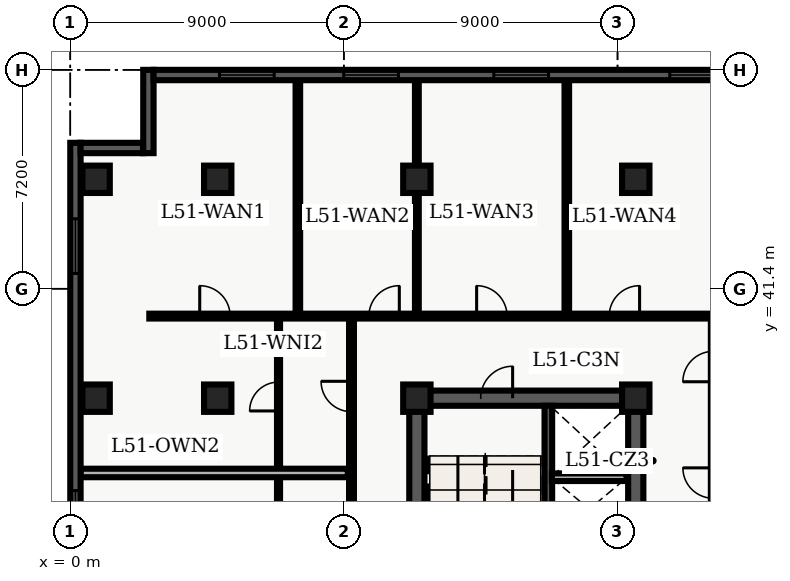
"""IFC4 building model, lengths in metres.
Left out: names, types, materials, properties, quantities, classifications, styles, units other than length and angle.
Written with IfcOpenShell. Run it as: python <this file> out.ifc"""

import sys

from ifc_helpers import new_model, entity, si_unit, converted_unit, direction, frame, origin_with_axes, origin_2d_with_axis, place, context, subcontext, project, spatial, polyline, rectangle, outline, extrude, element, fill, save


model = new_model("IFC4")
c1 = context("Model", 3, precision=1e-05, world=origin_with_axes(), true_north=direction((0.0, 1.0)))
c2 = subcontext(c1, "Body", "Model", "MODEL_VIEW")
j1 = project(units=[si_unit("LENGTHUNIT", "METRE"), converted_unit("PLANEANGLEUNIT", "DEGREE", entity("IfcPlaneAngleMeasure", 0.017), si_unit("PLANEANGLEUNIT", "RADIAN"), dimensions=[0, 0, 0, 0, 0, 0, 0])], contexts=[c1])
p1 = place(None, origin_with_axes())
s1 = spatial("IfcSite", under=j1, at=p1, CompositionType="ELEMENT")
p2 = place(p1, origin_with_axes())
s2 = spatial("IfcBuilding", under=s1, at=p2, CompositionType="ELEMENT")
p3 = place(p2, frame((0.0, 0.0, 208.2), z_axis=(0.0, 0.0, 1.0), x_axis=(1.0, 0.0, 0.0)))
s3 = spatial("IfcBuildingStorey", under=s2, at=p3, CompositionType="ELEMENT", Elevation=208.2)
p4 = place(p3, frame((11.4, 10.8, 0.0), z_axis=(0.0, 0.0, 1.0), x_axis=(0.0, 1.0, 0.0)))
e1 = element("IfcWall", 1, at=p4, inside=s3, PredefinedType="SHEAR", context=c2, shape_type="SweptSolid", body=[
    extrude(outline(polyline([(0.0, -0.25), (27.0, -0.25), (27.0, 0.25), (0.0, 0.25), (0.0, -0.25)])), origin_with_axes(), (0.0, 0.0, 1.0), 3.66),
])
p5 = place(p3, frame((11.4, 37.8, 0.0), z_axis=(0.0, 0.0, 1.0), x_axis=(1.0, 0.0, 0.0)))
e2 = element("IfcWall", 2, at=p5, inside=s3, PredefinedType="SHEAR", context=c2, shape_type="SweptSolid", body=[
    extrude(outline(polyline([(0.0, -0.25), (7.2, -0.25), (7.2, 0.25), (0.0, 0.25), (0.0, -0.25)])), origin_with_axes(), (0.0, 0.0, 1.0), 3.66),
])
p6 = place(p5, frame((2.625, 0.0, 0.0), z_axis=(0.0, 0.0, 1.0), x_axis=(1.0, 0.0, 0.0)))
e3 = element("IfcOpeningElement", 3, at=p6, cuts=e2, PredefinedType="OPENING", context=c2, shape_type="SweptSolid", body=[
    extrude(rectangle(XDim=1.05, YDim=0.52, at=origin_2d_with_axis()), origin_with_axes(), (0.0, 0.0, 1.0), 2.15),
])
p7 = place(p3, frame((18.6, 24.3, 0.0), z_axis=(0.0, 0.0, 1.0), x_axis=(0.0, 1.0, 0.0)))
e4 = element("IfcWall", 4, at=p7, inside=s3, PredefinedType="SHEAR", context=c2, shape_type="SweptSolid", body=[
    extrude(outline(polyline([(0.0, -0.25), (13.5, -0.25), (13.5, 0.25), (0.0, 0.25), (0.0, -0.25)])), origin_with_axes(), (0.0, 0.0, 1.0), 3.66),
])
p8 = place(p7, frame((5.65, 0.0, 0.0), z_axis=(0.0, 0.0, 1.0), x_axis=(1.0, 0.0, 0.0)))
e5 = element("IfcOpeningElement", 5, at=p8, cuts=e4, PredefinedType="OPENING", context=c2, shape_type="SweptSolid", body=[
    extrude(rectangle(XDim=1.1, YDim=0.52, at=origin_2d_with_axis()), origin_with_axes(), (0.0, 0.0, 1.0), 2.15),
])
p9 = place(p7, frame((7.75, 0.0, 0.0), z_axis=(0.0, 0.0, 1.0), x_axis=(1.0, 0.0, 0.0)))
e6 = element("IfcOpeningElement", 6, at=p9, cuts=e4, PredefinedType="OPENING", context=c2, shape_type="SweptSolid", body=[
    extrude(rectangle(XDim=1.1, YDim=0.52, at=origin_2d_with_axis()), origin_with_axes(), (0.0, 0.0, 1.0), 2.15),
])
p10 = place(p3, frame((15.725, 28.9, 0.0), z_axis=(0.0, 0.0, 1.0), x_axis=(0.0, 1.0, 0.0)))
e7 = element("IfcWall", 7, at=p10, inside=s3, PredefinedType="SHEAR", context=c2, shape_type="SweptSolid", body=[
    extrude(outline(polyline([(0.0, -0.125), (8.65, -0.125), (8.65, 0.125), (0.0, 0.125), (0.0, -0.125)])), origin_with_axes(), (0.0, 0.0, 1.0), 3.66),
])
for number, where, z_axis, x_axis in (
    (8, (11.4, 37.8, 0.0), (0.0, 0.0, 1.0), (1.0, 0.0, 0.0)),
    (9, (11.4, 45.0, 0.0), (0.0, 0.0, 1.0), (1.0, 0.0, 0.0)),
    (10, (18.6, 37.8, 0.0), (0.0, 0.0, 1.0), (1.0, 0.0, 0.0)),
    (11, (18.6, 45.0, 0.0), (0.0, 0.0, 1.0), (1.0, 0.0, 0.0)),
    (12, (4.85, 37.8, 0.0), (0.0, 0.0, 1.0), (1.0, 0.0, 0.0)),
    (13, (4.85, 45.0, 0.0), (0.0, 0.0, 1.0), (1.0, 0.0, 0.0)),
    (14, (0.85, 37.8, 0.0), (0.0, 0.0, 1.0), (1.0, 0.0, 0.0)),
    (15, (0.85, 45.0, 0.0), (0.0, 0.0, 1.0), (1.0, 0.0, 0.0)),
):
    element("IfcColumn", number, at=place(p3, frame(where, z_axis=z_axis, x_axis=x_axis)), inside=s3, PredefinedType="COLUMN", context=c2, shape_type="SweptSolid", body=[
        extrude(rectangle(XDim=0.9, YDim=0.9, at=origin_2d_with_axis()), origin_with_axes(), (0.0, 0.0, 1.0), 3.9),
    ])
p11 = place(p3, frame((15.84, 35.2, 0.0), z_axis=(0.0, 0.0, 1.0), x_axis=(1.0, 0.0, 0.0)))
e16 = element("IfcWall", 16, at=p11, inside=s3, PredefinedType="SOLIDWALL", context=c2, shape_type="SweptSolid", body=[
    extrude(outline(polyline([(0.0, -0.125), (2.46, -0.125), (2.46, 0.125), (0.0, 0.125), (0.0, -0.125)])), origin_with_axes(), (0.0, 0.0, 1.0), 2.7),
])
p12 = place(p3, frame((2.6, 40.5, 0.0), z_axis=(0.0, 0.0, 1.0), x_axis=(1.0, 0.0, 0.0)))
e17 = element("IfcWall", 17, at=p12, inside=s3, PredefinedType="PARTITIONING", context=c2, shape_type="SweptSolid", body=[
    extrude(outline(polyline([(0.0, -0.08), (27.751, -0.08), (27.751, 0.08), (0.0, 0.08), (0.0, -0.08)])), origin_with_axes(), (0.0, 0.0, 1.0), 2.7),
])
p13 = place(p12, frame((2.158, 0.0, 0.0), z_axis=(0.0, 0.0, 1.0), x_axis=(1.0, 0.0, 0.0)))
e18 = element("IfcOpeningElement", 18, at=p13, cuts=e17, PredefinedType="OPENING", context=c2, shape_type="SweptSolid", body=[
    extrude(rectangle(XDim=1.0, YDim=0.18, at=origin_2d_with_axis()), origin_with_axes(), (0.0, 0.0, 1.0), 2.15),
])
p14 = place(p12, frame((7.723, 0.0, 0.0), z_axis=(0.0, 0.0, 1.0), x_axis=(1.0, 0.0, 0.0)))
e19 = element("IfcOpeningElement", 19, at=p14, cuts=e17, PredefinedType="OPENING", context=c2, shape_type="SweptSolid", body=[
    extrude(rectangle(XDim=1.0, YDim=0.18, at=origin_2d_with_axis()), origin_with_axes(), (0.0, 0.0, 1.0), 2.15),
])
p15 = place(p12, frame((11.266, 0.0, 0.0), z_axis=(0.0, 0.0, 1.0), x_axis=(1.0, 0.0, 0.0)))
e20 = element("IfcOpeningElement", 20, at=p15, cuts=e17, PredefinedType="OPENING", context=c2, shape_type="SweptSolid", body=[
    extrude(rectangle(XDim=1.0, YDim=0.18, at=origin_2d_with_axis()), origin_with_axes(), (0.0, 0.0, 1.0), 2.15),
])
p16 = place(p12, frame((15.626, 0.0, 0.0), z_axis=(0.0, 0.0, 1.0), x_axis=(1.0, 0.0, 0.0)))
e21 = element("IfcOpeningElement", 21, at=p16, cuts=e17, PredefinedType="OPENING", context=c2, shape_type="SweptSolid", body=[
    extrude(rectangle(XDim=1.0, YDim=0.18, at=origin_2d_with_axis()), origin_with_axes(), (0.0, 0.0, 1.0), 2.15),
])
p17 = place(p3, frame((9.25, 24.4, 0.0), z_axis=(0.0, 0.0, 1.0), x_axis=(0.0, 1.0, 0.0)))
e22 = element("IfcWall", 22, at=p17, inside=s3, PredefinedType="PARTITIONING", context=c2, shape_type="SweptSolid", body=[
    extrude(outline(polyline([(0.0, -0.08), (16.1, -0.08), (16.1, 0.08), (0.0, 0.08), (0.0, -0.08)])), origin_with_axes(), (0.0, 0.0, 1.0), 2.7),
])
p18 = place(p17, frame((5.51, 0.0, 0.0), z_axis=(0.0, 0.0, 1.0), x_axis=(1.0, 0.0, 0.0)))
e23 = element("IfcOpeningElement", 23, at=p18, cuts=e22, PredefinedType="OPENING", context=c2, shape_type="SweptSolid", body=[
    extrude(rectangle(XDim=1.0, YDim=0.18, at=origin_2d_with_axis()), origin_with_axes(), (0.0, 0.0, 1.0), 2.15),
])
p19 = place(p17, frame((13.455, 0.0, 0.0), z_axis=(0.0, 0.0, 1.0), x_axis=(1.0, 0.0, 0.0)))
e24 = element("IfcOpeningElement", 24, at=p19, cuts=e22, PredefinedType="OPENING", context=c2, shape_type="SweptSolid", body=[
    extrude(rectangle(XDim=1.0, YDim=0.18, at=origin_2d_with_axis()), origin_with_axes(), (0.0, 0.0, 1.0), 2.15),
])
p20 = place(p3, frame((6.85, 24.55, 0.0), z_axis=(0.0, 0.0, 1.0), x_axis=(0.0, 1.0, 0.0)))
e25 = element("IfcWall", 25, at=p20, inside=s3, PredefinedType="PARTITIONING", context=c2, shape_type="SweptSolid", body=[
    extrude(outline(polyline([(0.0, -0.05), (15.75, -0.05), (15.75, 0.05), (0.0, 0.05), (0.0, -0.05)])), origin_with_axes(), (0.0, 0.0, 1.0), 2.7),
])
p21 = place(p20, frame((5.36, 0.0, 0.0), z_axis=(0.0, 0.0, 1.0), x_axis=(1.0, 0.0, 0.0)))
e26 = element("IfcOpeningElement", 26, at=p21, cuts=e25, PredefinedType="OPENING", context=c2, shape_type="SweptSolid", body=[
    extrude(rectangle(XDim=0.95, YDim=0.12, at=origin_2d_with_axis()), origin_with_axes(), (0.0, 0.0, 1.0), 2.15),
])
p22 = place(p20, frame((13.305, 0.0, 0.0), z_axis=(0.0, 0.0, 1.0), x_axis=(1.0, 0.0, 0.0)))
e27 = element("IfcOpeningElement", 27, at=p22, cuts=e25, PredefinedType="OPENING", context=c2, shape_type="SweptSolid", body=[
    extrude(rectangle(XDim=0.95, YDim=0.12, at=origin_2d_with_axis()), origin_with_axes(), (0.0, 0.0, 1.0), 2.15),
])
p23 = place(p3, frame((0.335, 35.34, 0.0), z_axis=(0.0, 0.0, 1.0), x_axis=(1.0, 0.0, 0.0)))
e28 = element("IfcWall", 28, at=p23, inside=s3, PredefinedType="PARTITIONING", context=c2, shape_type="SweptSolid", body=[
    extrude(outline(polyline([(0.0, -0.14), (8.795, -0.14), (8.795, 0.14), (0.0, 0.14), (0.0, -0.14)])), origin_with_axes(), (0.0, 0.0, 1.0), 2.7),
])
p24 = place(p3, frame((7.486, 40.6, 0.0), z_axis=(0.0, 0.0, 1.0), x_axis=(0.0, 1.0, 0.0)))
e29 = element("IfcWall", 29, at=p24, inside=s3, PredefinedType="PARTITIONING", context=c2, shape_type="SweptSolid", body=[
    extrude(outline(polyline([(0.0, -0.075), (7.665, -0.075), (7.665, 0.075), (0.0, 0.075), (0.0, -0.075)])), origin_with_axes(), (0.0, 0.0, 1.0), 2.7),
])
p25 = place(p3, frame((11.4, 40.6, 0.0), z_axis=(0.0, 0.0, 1.0), x_axis=(0.0, 1.0, 0.0)))
e30 = element("IfcWall", 30, at=p25, inside=s3, PredefinedType="PARTITIONING", context=c2, shape_type="SweptSolid", body=[
    extrude(outline(polyline([(0.0, -0.062), (7.665, -0.062), (7.665, 0.062), (0.0, 0.062), (0.0, -0.062)])), origin_with_axes(), (0.0, 0.0, 1.0), 2.7),
])
p26 = place(p3, frame((16.332, 40.6, 0.0), z_axis=(0.0, 0.0, 1.0), x_axis=(0.0, 1.0, 0.0)))
e31 = element("IfcWall", 31, at=p26, inside=s3, PredefinedType="PARTITIONING", context=c2, shape_type="SweptSolid", body=[
    extrude(outline(polyline([(0.0, -0.075), (7.665, -0.075), (7.665, 0.075), (0.0, 0.075), (0.0, -0.075)])), origin_with_axes(), (0.0, 0.0, 1.0), 2.7),
])
p27 = place(p3, frame((0.17, 2.74, 0.0), z_axis=(0.0, 0.0, 1.0), x_axis=(0.0, 1.0, 0.0)))
e32 = element("IfcWall", 32, at=p27, inside=s3, PredefinedType="SOLIDWALL", context=c2, shape_type="SweptSolid", body=[
    extrude(outline(polyline([(0.0, -0.17), (43.46, -0.17), (43.46, 0.17), (0.0, 0.17), (0.0, -0.17)])), origin_with_axes(), (0.0, 0.0, 1.0), 3.66),
])
p28 = place(p27, frame((2.948, 0.0, 0.45), z_axis=(0.0, 0.0, 1.0), x_axis=(1.0, 0.0, 0.0)))
e33 = element("IfcOpeningElement", 33, at=p28, cuts=e32, PredefinedType="OPENING", context=c2, shape_type="SweptSolid", body=[
    extrude(rectangle(XDim=1.8, YDim=0.36, at=origin_2d_with_axis()), origin_with_axes(), (0.0, 0.0, 1.0), 2.1),
])
p29 = place(p27, frame((12.339, 0.0, 0.45), z_axis=(0.0, 0.0, 1.0), x_axis=(1.0, 0.0, 0.0)))
e34 = element("IfcOpeningElement", 34, at=p29, cuts=e32, PredefinedType="OPENING", context=c2, shape_type="SweptSolid", body=[
    extrude(rectangle(XDim=1.8, YDim=0.36, at=origin_2d_with_axis()), origin_with_axes(), (0.0, 0.0, 1.0), 2.1),
])
p30 = place(p27, frame((26.426, 0.0, 0.45), z_axis=(0.0, 0.0, 1.0), x_axis=(1.0, 0.0, 0.0)))
e35 = element("IfcOpeningElement", 35, at=p30, cuts=e32, PredefinedType="OPENING", context=c2, shape_type="SweptSolid", body=[
    extrude(rectangle(XDim=1.8, YDim=0.36, at=origin_2d_with_axis()), origin_with_axes(), (0.0, 0.0, 1.0), 2.1),
])
p31 = place(p27, frame((31.121, 0.0, 0.45), z_axis=(0.0, 0.0, 1.0), x_axis=(1.0, 0.0, 0.0)))
e36 = element("IfcOpeningElement", 36, at=p31, cuts=e32, PredefinedType="OPENING", context=c2, shape_type="SweptSolid", body=[
    extrude(rectangle(XDim=1.8, YDim=0.36, at=origin_2d_with_axis()), origin_with_axes(), (0.0, 0.0, 1.0), 2.1),
])
p32 = place(p27, frame((40.062, 0.0, 0.45), z_axis=(0.0, 0.0, 1.0), x_axis=(1.0, 0.0, 0.0)))
e37 = element("IfcOpeningElement", 37, at=p32, cuts=e32, PredefinedType="OPENING", context=c2, shape_type="SweptSolid", body=[
    extrude(rectangle(XDim=1.8, YDim=0.36, at=origin_2d_with_axis()), origin_with_axes(), (0.0, 0.0, 1.0), 2.1),
])
p33 = place(p3, frame((0.34, 46.03, 0.0), z_axis=(0.0, 0.0, 1.0), x_axis=(1.0, 0.0, 0.0)))
e38 = element("IfcWall", 38, at=p33, inside=s3, PredefinedType="SOLIDWALL", context=c2, shape_type="SweptSolid", body=[
    extrude(outline(polyline([(0.0, -0.17), (2.06, -0.17), (2.06, 0.17), (0.0, 0.17), (0.0, -0.17)])), origin_with_axes(), (0.0, 0.0, 1.0), 3.66),
])
p34 = place(p3, frame((2.57, 45.86, 0.0), z_axis=(0.0, 0.0, 1.0), x_axis=(0.0, 1.0, 0.0)))
e39 = element("IfcWall", 39, at=p34, inside=s3, PredefinedType="SOLIDWALL", context=c2, shape_type="SweptSolid", body=[
    extrude(outline(polyline([(0.0, -0.17), (2.74, -0.17), (2.74, 0.17), (0.0, 0.17), (0.0, -0.17)])), origin_with_axes(), (0.0, 0.0, 1.0), 3.66),
])
p35 = place(p3, frame((2.74, 48.43, 0.0), z_axis=(0.0, 0.0, 1.0), x_axis=(1.0, 0.0, 0.0)))
e40 = element("IfcWall", 40, at=p35, inside=s3, PredefinedType="SOLIDWALL", context=c2, shape_type="SweptSolid", body=[
    extrude(outline(polyline([(0.0, -0.17), (20.946, -0.17), (20.946, 0.17), (0.0, 0.17), (0.0, -0.17)])), origin_with_axes(), (0.0, 0.0, 1.0), 3.66),
])
p36 = place(p35, frame((3.068, 0.0, 0.45), z_axis=(0.0, 0.0, 1.0), x_axis=(1.0, 0.0, 0.0)))
e41 = element("IfcOpeningElement", 41, at=p36, cuts=e40, PredefinedType="OPENING", context=c2, shape_type="SweptSolid", body=[
    extrude(rectangle(XDim=1.8, YDim=0.36, at=origin_2d_with_axis()), origin_with_axes(), (0.0, 0.0, 1.0), 2.1),
])
p37 = place(p35, frame((7.155, 0.0, 0.45), z_axis=(0.0, 0.0, 1.0), x_axis=(1.0, 0.0, 0.0)))
e42 = element("IfcOpeningElement", 42, at=p37, cuts=e40, PredefinedType="OPENING", context=c2, shape_type="SweptSolid", body=[
    extrude(rectangle(XDim=1.8, YDim=0.36, at=origin_2d_with_axis()), origin_with_axes(), (0.0, 0.0, 1.0), 2.1),
])
p38 = place(p35, frame((12.091, 0.0, 0.45), z_axis=(0.0, 0.0, 1.0), x_axis=(1.0, 0.0, 0.0)))
e43 = element("IfcOpeningElement", 43, at=p38, cuts=e40, PredefinedType="OPENING", context=c2, shape_type="SweptSolid", body=[
    extrude(rectangle(XDim=1.8, YDim=0.36, at=origin_2d_with_axis()), origin_with_axes(), (0.0, 0.0, 1.0), 2.1),
])
p39 = place(p35, frame((17.878, 0.0, 0.45), z_axis=(0.0, 0.0, 1.0), x_axis=(1.0, 0.0, 0.0)))
e44 = element("IfcOpeningElement", 44, at=p39, cuts=e40, PredefinedType="OPENING", context=c2, shape_type="SweptSolid", body=[
    extrude(rectangle(XDim=1.8, YDim=0.36, at=origin_2d_with_axis()), origin_with_axes(), (0.0, 0.0, 1.0), 2.1),
])
p40 = place(p5, frame((2.625, 0.0, 0.0), z_axis=(0.0, 0.0, 1.0), x_axis=(1.0, 0.0, 0.0)))
e45 = element("IfcDoor", 45, at=p40, inside=s3, OperationType="SINGLE_SWING_RIGHT", PredefinedType="DOOR", context=c2, shape_type="SweptSolid", body=[
    extrude(rectangle(XDim=1.05, YDim=0.09, at=origin_2d_with_axis()), origin_with_axes(), (0.0, 0.0, 1.0), 2.15),
])
fill(e3, e45)
p41 = place(p20, frame((13.305, 0.0, 0.0), z_axis=(0.0, 0.0, 1.0), x_axis=(1.0, 0.0, 0.0)))
e46 = element("IfcDoor", 46, at=p41, inside=s3, OperationType="SINGLE_SWING_LEFT", PredefinedType="DOOR", context=c2, shape_type="SweptSolid", body=[
    extrude(rectangle(XDim=0.95, YDim=0.06, at=origin_2d_with_axis()), origin_with_axes(), (0.0, 0.0, 1.0), 2.15),
])
fill(e27, e46)
p42 = place(p17, frame((13.455, 0.0, 0.0), z_axis=(0.0, 0.0, 1.0), x_axis=(1.0, 0.0, 0.0)))
e47 = element("IfcDoor", 47, at=p42, inside=s3, OperationType="SINGLE_SWING_RIGHT", PredefinedType="DOOR", context=c2, shape_type="SweptSolid", body=[
    extrude(rectangle(XDim=1.0, YDim=0.09, at=origin_2d_with_axis()), origin_with_axes(), (0.0, 0.0, 1.0), 2.15),
])
fill(e24, e47)
p43 = place(p12, frame((2.158, 0.0, 0.0), z_axis=(0.0, 0.0, 1.0), x_axis=(1.0, 0.0, 0.0)))
e48 = element("IfcDoor", 48, at=p43, inside=s3, OperationType="SINGLE_SWING_LEFT", PredefinedType="DOOR", context=c2, shape_type="SweptSolid", body=[
    extrude(rectangle(XDim=1.0, YDim=0.09, at=origin_2d_with_axis()), origin_with_axes(), (0.0, 0.0, 1.0), 2.15),
])
fill(e18, e48)
p44 = place(p12, frame((7.723, 0.0, 0.0), z_axis=(0.0, 0.0, 1.0), x_axis=(1.0, 0.0, 0.0)))
e49 = element("IfcDoor", 49, at=p44, inside=s3, OperationType="SINGLE_SWING_RIGHT", PredefinedType="DOOR", context=c2, shape_type="SweptSolid", body=[
    extrude(rectangle(XDim=1.0, YDim=0.09, at=origin_2d_with_axis()), origin_with_axes(), (0.0, 0.0, 1.0), 2.15),
])
fill(e19, e49)
p45 = place(p12, frame((11.266, 0.0, 0.0), z_axis=(0.0, 0.0, 1.0), x_axis=(1.0, 0.0, 0.0)))
e50 = element("IfcDoor", 50, at=p45, inside=s3, OperationType="SINGLE_SWING_LEFT", PredefinedType="DOOR", context=c2, shape_type="SweptSolid", body=[
    extrude(rectangle(XDim=1.0, YDim=0.09, at=origin_2d_with_axis()), origin_with_axes(), (0.0, 0.0, 1.0), 2.15),
])
fill(e20, e50)
p46 = place(p12, frame((15.626, 0.0, 0.0), z_axis=(0.0, 0.0, 1.0), x_axis=(1.0, 0.0, 0.0)))
e51 = element("IfcDoor", 51, at=p46, inside=s3, OperationType="SINGLE_SWING_RIGHT", PredefinedType="DOOR", context=c2, shape_type="SweptSolid", body=[
    extrude(rectangle(XDim=1.0, YDim=0.09, at=origin_2d_with_axis()), origin_with_axes(), (0.0, 0.0, 1.0), 2.15),
])
fill(e21, e51)
p47 = place(p27, frame((31.121, 0.0, 0.45), z_axis=(0.0, 0.0, 1.0), x_axis=(1.0, 0.0, 0.0)))
e52 = element("IfcWindow", 52, at=p47, inside=s3, PredefinedType="WINDOW", context=c2, shape_type="SweptSolid", body=[
    extrude(rectangle(XDim=1.8, YDim=0.09, at=origin_2d_with_axis()), origin_with_axes(), (0.0, 0.0, 1.0), 2.1),
])
fill(e36, e52)
p48 = place(p27, frame((40.062, 0.0, 0.45), z_axis=(0.0, 0.0, 1.0), x_axis=(1.0, 0.0, 0.0)))
e53 = element("IfcWindow", 53, at=p48, inside=s3, PredefinedType="WINDOW", context=c2, shape_type="SweptSolid", body=[
    extrude(rectangle(XDim=1.8, YDim=0.09, at=origin_2d_with_axis()), origin_with_axes(), (0.0, 0.0, 1.0), 2.1),
])
fill(e37, e53)
p49 = place(p35, frame((3.068, 0.0, 0.45), z_axis=(0.0, 0.0, 1.0), x_axis=(1.0, 0.0, 0.0)))
e54 = element("IfcWindow", 54, at=p49, inside=s3, PredefinedType="WINDOW", context=c2, shape_type="SweptSolid", body=[
    extrude(rectangle(XDim=1.8, YDim=0.09, at=origin_2d_with_axis()), origin_with_axes(), (0.0, 0.0, 1.0), 2.1),
])
fill(e41, e54)
p50 = place(p35, frame((7.155, 0.0, 0.45), z_axis=(0.0, 0.0, 1.0), x_axis=(1.0, 0.0, 0.0)))
e55 = element("IfcWindow", 55, at=p50, inside=s3, PredefinedType="WINDOW", context=c2, shape_type="SweptSolid", body=[
    extrude(rectangle(XDim=1.8, YDim=0.09, at=origin_2d_with_axis()), origin_with_axes(), (0.0, 0.0, 1.0), 2.1),
])
fill(e42, e55)
p51 = place(p35, frame((12.091, 0.0, 0.45), z_axis=(0.0, 0.0, 1.0), x_axis=(1.0, 0.0, 0.0)))
e56 = element("IfcWindow", 56, at=p51, inside=s3, PredefinedType="WINDOW", context=c2, shape_type="SweptSolid", body=[
    extrude(rectangle(XDim=1.8, YDim=0.09, at=origin_2d_with_axis()), origin_with_axes(), (0.0, 0.0, 1.0), 2.1),
])
fill(e43, e56)
p52 = place(p35, frame((17.878, 0.0, 0.45), z_axis=(0.0, 0.0, 1.0), x_axis=(1.0, 0.0, 0.0)))
e57 = element("IfcWindow", 57, at=p52, inside=s3, PredefinedType="WINDOW", context=c2, shape_type="SweptSolid", body=[
    extrude(rectangle(XDim=1.8, YDim=0.09, at=origin_2d_with_axis()), origin_with_axes(), (0.0, 0.0, 1.0), 2.1),
])
fill(e44, e57)
save(model, sys.argv[1])
